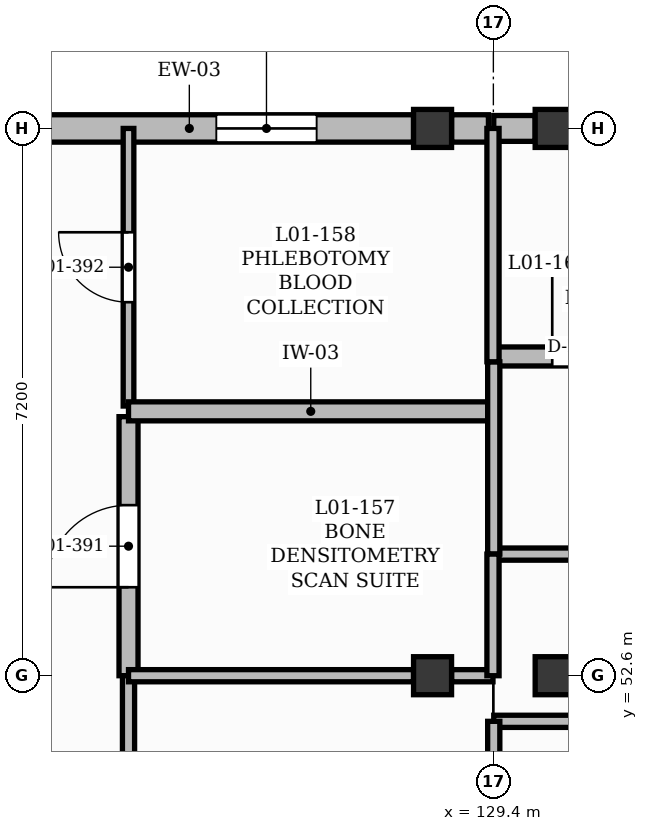
"""IFC4 building model, lengths in metres.
Left out: names, types, materials, properties, quantities, classifications, styles, units other than length and angle.
Written with IfcOpenShell. Run it as: python <this file> out.ifc"""

import sys

from ifc_helpers import new_model, si_unit, direction, frame, frame_2d, origin, origin_2d, place, context, subcontext, project, spatial, rectangle, extrude, element, fill, save


model = new_model("IFC4")
c1 = context("Model", 3, precision=1e-05, world=origin(), true_north=direction((0.0, 1.0)))
c2 = subcontext(c1, "Body", "Model", "MODEL_VIEW")
j1 = project(units=[si_unit("LENGTHUNIT", "METRE"), si_unit("PLANEANGLEUNIT", "RADIAN")], contexts=[c1])
p1 = place(None, origin())
s1 = spatial("IfcSite", under=j1, at=p1, CompositionType="ELEMENT")
p2 = place(p1, origin())
s2 = spatial("IfcBuilding", under=s1, at=p2, CompositionType="ELEMENT")
p3 = place(p2, frame((0.0, 0.0, 4.5)))
s3 = spatial("IfcBuildingStorey", under=s2, at=p3, CompositionType="ELEMENT", Elevation=4.5)
for number, where, z_axis, x_axis in (
    (1, (128.6, 52.6, 0.0), (0.0, 0.0, 1.0), (1.0, 0.0, 0.0)),
    (2, (128.6, 59.8, 0.0), (0.0, 0.0, 1.0), (1.0, 0.0, 0.0)),
    (3, (130.2, 52.6, 0.0), (0.0, 0.0, 1.0), (1.0, 0.0, 0.0)),
    (4, (130.2, 59.8, 0.0), (0.0, 0.0, 1.0), (1.0, 0.0, 0.0)),
):
    element("IfcColumn", number, at=place(p3, frame(where, z_axis=z_axis, x_axis=x_axis)), inside=s3, PredefinedType="COLUMN", context=c2, shape_type="SweptSolid", body=[
        extrude(rectangle(XDim=0.5, YDim=0.5, at=origin_2d()), origin(), (0.0, 0.0, 1.0), 4.22),
    ])
p4 = place(p3, frame((122.45, 59.8, 0.0), z_axis=(0.0, 0.0, 1.0), x_axis=(1.0, 0.0, 0.0)))
e5 = element("IfcWall", 5, at=p4, inside=s3, PredefinedType="SOLIDWALL", context=c2, shape_type="SweptSolid", body=[
    extrude(rectangle(XDim=5.9, YDim=0.36, at=frame_2d((2.95, 0.0))), origin(), (0.0, 0.0, 1.0), 3.52),
])
p5 = place(p4, frame((3.305, 0.0, 1.5)))
e6 = element("IfcOpeningElement", 6, at=p5, cuts=e5, PredefinedType="OPENING", context=c2, shape_type="SweptSolid", body=[
    extrude(rectangle(XDim=1.32, YDim=1.25, at=frame_2d((0.66, 0.625))), frame((0.0, 0.19, 0.0), z_axis=(0.0, -1.0, 0.0), x_axis=(1.0, 0.0, 0.0)), (0.0, 0.0, 1.0), 0.38),
])
p6 = place(p3, frame((128.85, 59.8, 0.0), z_axis=(0.0, 0.0, 1.0), x_axis=(1.0, 0.0, 0.0)))
e7 = element("IfcWall", 7, at=p6, inside=s3, PredefinedType="SOLIDWALL", context=c2, shape_type="SweptSolid", body=[
    extrude(rectangle(XDim=0.485, YDim=0.36, at=frame_2d((0.242, 0.0))), origin(), (0.0, 0.0, 1.0), 4.22),
])
p7 = place(p3, frame((129.405, 59.8, 0.0), z_axis=(0.0, 0.0, 1.0), x_axis=(1.0, 0.0, 0.0)))
e8 = element("IfcWall", 8, at=p7, inside=s3, PredefinedType="SOLIDWALL", context=c2, shape_type="SweptSolid", body=[
    extrude(rectangle(XDim=0.545, YDim=0.34, at=frame_2d((0.272, 0.0))), origin(), (0.0, 0.0, 1.0), 4.22),
])
p8 = place(p3, frame((124.6, 52.6, 0.0), z_axis=(0.0, 0.0, 1.0), x_axis=(0.0, 1.0, 0.0)))
e9 = element("IfcWall", 9, at=p8, inside=s3, PredefinedType="SOLIDWALL", context=c2, shape_type="SweptSolid", body=[
    extrude(rectangle(XDim=3.408, YDim=0.25, at=frame_2d((1.704, 0.0))), origin(), (0.0, 0.0, 1.0), 4.18),
])
p9 = place(p8, frame((1.164, 0.0, 0.0)))
e10 = element("IfcOpeningElement", 10, at=p9, cuts=e9, PredefinedType="OPENING", context=c2, shape_type="SweptSolid", body=[
    extrude(rectangle(XDim=1.08, YDim=2.15, at=frame_2d((0.54, 1.075))), frame((0.0, 0.135, 0.0), z_axis=(0.0, -1.0, 0.0), x_axis=(1.0, 0.0, 0.0)), (0.0, 0.0, 1.0), 0.27),
])
p10 = place(p3, frame((124.6, 56.148, 0.0), z_axis=(0.0, 0.0, 1.0), x_axis=(0.0, 1.0, 0.0)))
e11 = element("IfcWall", 11, at=p10, inside=s3, PredefinedType="PARTITIONING", context=c2, shape_type="SweptSolid", body=[
    extrude(rectangle(XDim=3.652, YDim=0.14, at=frame_2d((1.826, 0.0))), origin(), (0.0, 0.0, 1.0), 4.18),
])
p11 = place(p10, frame((1.366, 0.0, 0.0)))
e12 = element("IfcOpeningElement", 12, at=p11, cuts=e11, PredefinedType="OPENING", context=c2, shape_type="SweptSolid", body=[
    extrude(rectangle(XDim=0.92, YDim=2.1, at=frame_2d((0.46, 1.05))), frame((0.0, 0.08, 0.0), z_axis=(0.0, -1.0, 0.0), x_axis=(1.0, 0.0, 0.0)), (0.0, 0.0, 1.0), 0.16),
])
p12 = place(p3, frame((124.6, 56.078, 0.0), z_axis=(0.0, 0.0, 1.0), x_axis=(1.0, 0.0, 0.0)))
e13 = element("IfcWall", 13, at=p12, inside=s3, PredefinedType="SOLIDWALL", context=c2, shape_type="SweptSolid", body=[
    extrude(rectangle(XDim=4.795, YDim=0.25, at=frame_2d((2.397, 0.0))), origin(), (0.0, 0.0, 1.0), 4.18),
])
p13 = place(p3, frame((129.405, 56.8, 0.0), z_axis=(0.0, 0.0, 1.0), x_axis=(1.0, 0.0, 0.0)))
e14 = element("IfcWall", 14, at=p13, inside=s3, PredefinedType="SOLIDWALL", context=c2, shape_type="SweptSolid", body=[
    extrude(rectangle(XDim=2.619, YDim=0.25, at=frame_2d((1.31, 0.0))), origin(), (0.0, 0.0, 1.0), 4.18),
])
p14 = place(p13, frame((0.77, 0.0, 0.0)))
e15 = element("IfcOpeningElement", 15, at=p14, cuts=e14, PredefinedType="OPENING", context=c2, shape_type="SweptSolid", body=[
    extrude(rectangle(XDim=1.08, YDim=2.15, at=frame_2d((0.54, 1.075))), frame((0.0, 0.135, 0.0), z_axis=(0.0, -1.0, 0.0), x_axis=(1.0, 0.0, 0.0)), (0.0, 0.0, 1.0), 0.27),
])
p15 = place(p3, frame((124.6, 50.6, 0.0), z_axis=(0.0, 0.0, 1.0), x_axis=(0.0, 1.0, 0.0)))
e16 = element("IfcWall", 16, at=p15, inside=s3, PredefinedType="PARTITIONING", context=c2, shape_type="SweptSolid", body=[
    extrude(rectangle(XDim=2.0, YDim=0.16, at=frame_2d((1.0, 0.0))), origin(), (0.0, 0.0, 1.0), 4.18),
])
p16 = place(p3, frame((133.8, 52.0, 0.0), z_axis=(0.0, 0.0, 1.0), x_axis=(-1.0, 0.0, 0.0)))
e17 = element("IfcWall", 17, at=p16, inside=s3, PredefinedType="PARTITIONING", context=c2, shape_type="SweptSolid", body=[
    extrude(rectangle(XDim=4.395, YDim=0.16, at=frame_2d((2.198, 0.0))), origin(), (0.0, 0.0, 1.0), 4.18),
])
p17 = place(p3, frame((129.405, 50.6, 0.0), z_axis=(0.0, 0.0, 1.0), x_axis=(0.0, 1.0, 0.0)))
e18 = element("IfcWall", 18, at=p17, inside=s3, PredefinedType="PARTITIONING", context=c2, shape_type="SweptSolid", body=[
    extrude(rectangle(XDim=1.4, YDim=0.16, at=frame_2d((0.7, 0.0))), origin(), (0.0, 0.0, 1.0), 4.18),
])
p18 = place(p3, frame((129.405, 54.2, 0.0), z_axis=(0.0, 0.0, 1.0), x_axis=(1.0, 0.0, 0.0)))
e19 = element("IfcWall", 19, at=p18, inside=s3, PredefinedType="PARTITIONING", context=c2, shape_type="SweptSolid", body=[
    extrude(rectangle(XDim=4.395, YDim=0.16, at=frame_2d((2.198, 0.0))), origin(), (0.0, 0.0, 1.0), 4.18),
])
p19 = place(p3, frame((129.405, 54.2, 0.0), z_axis=(0.0, 0.0, 1.0), x_axis=(0.0, 1.0, 0.0)))
e20 = element("IfcWall", 20, at=p19, inside=s3, PredefinedType="PARTITIONING", context=c2, shape_type="SweptSolid", body=[
    extrude(rectangle(XDim=2.53, YDim=0.16, at=frame_2d((1.265, 0.0))), origin(), (0.0, 0.0, 1.0), 4.18),
])
p20 = place(p3, frame((124.6, 52.6, 0.0), z_axis=(0.0, 0.0, 1.0), x_axis=(1.0, 0.0, 0.0)))
e21 = element("IfcWall", 21, at=p20, inside=s3, PredefinedType="PARTITIONING", context=c2, shape_type="SweptSolid", body=[
    extrude(rectangle(XDim=3.75, YDim=0.16, at=frame_2d((1.875, 0.0))), origin(), (0.0, 0.0, 1.0), 3.52),
])
p21 = place(p3, frame((128.85, 52.6, 0.0), z_axis=(0.0, 0.0, 1.0), x_axis=(1.0, 0.0, 0.0)))
e22 = element("IfcWall", 22, at=p21, inside=s3, PredefinedType="PARTITIONING", context=c2, shape_type="SweptSolid", body=[
    extrude(rectangle(XDim=0.545, YDim=0.16, at=frame_2d((0.272, 0.0))), origin(), (0.0, 0.0, 1.0), 4.18),
])
p22 = place(p3, frame((129.395, 52.6, 0.0), z_axis=(0.0, 0.0, 1.0), x_axis=(0.0, 1.0, 0.0)))
e23 = element("IfcWall", 23, at=p22, inside=s3, PredefinedType="PARTITIONING", context=c2, shape_type="SweptSolid", body=[
    extrude(rectangle(XDim=1.6, YDim=0.16, at=frame_2d((0.8, 0.0))), origin(), (0.0, 0.0, 1.0), 4.18),
])
p23 = place(p3, frame((129.395, 56.73, 0.0), z_axis=(0.0, 0.0, 1.0), x_axis=(0.0, 1.0, 0.0)))
e24 = element("IfcWall", 24, at=p23, inside=s3, PredefinedType="PARTITIONING", context=c2, shape_type="SweptSolid", body=[
    extrude(rectangle(XDim=3.07, YDim=0.16, at=frame_2d((1.535, 0.0))), origin(), (0.0, 0.0, 1.0), 4.18),
])
p24 = place(p5, origin())
e25 = element("IfcWindow", 25, at=p24, inside=s3, PartitioningType="SINGLE_PANEL", PredefinedType="WINDOW", context=c2, shape_type="SweptSolid", body=[
    extrude(rectangle(XDim=1.32, YDim=1.25, at=frame_2d((0.66, 0.625))), frame((0.0, 0.03, 0.0), z_axis=(0.0, -1.0, 0.0), x_axis=(1.0, 0.0, 0.0)), (0.0, 0.0, 1.0), 0.06),
])
fill(e6, e25)
p25 = place(p9, origin())
e26 = element("IfcDoor", 26, at=p25, inside=s3, OperationType="SINGLE_SWING_LEFT", PredefinedType="DOOR", context=c2, shape_type="SweptSolid", body=[
    extrude(rectangle(XDim=1.08, YDim=2.15, at=frame_2d((0.54, 1.075))), frame((0.0, 0.025, 0.0), z_axis=(0.0, -1.0, 0.0), x_axis=(1.0, 0.0, 0.0)), (0.0, 0.0, 1.0), 0.05),
])
fill(e10, e26)
p26 = place(p11, origin())
e27 = element("IfcDoor", 27, at=p26, inside=s3, OperationType="SINGLE_SWING_RIGHT", PredefinedType="DOOR", context=c2, shape_type="SweptSolid", body=[
    extrude(rectangle(XDim=0.92, YDim=2.1, at=frame_2d((0.46, 1.05))), frame((0.0, 0.025, 0.0), z_axis=(0.0, -1.0, 0.0), x_axis=(1.0, 0.0, 0.0)), (0.0, 0.0, 1.0), 0.05),
])
fill(e12, e27)
p27 = place(p14, origin())
e28 = element("IfcDoor", 28, at=p27, inside=s3, OperationType="SINGLE_SWING_LEFT", PredefinedType="DOOR", context=c2, shape_type="SweptSolid", body=[
    extrude(rectangle(XDim=1.08, YDim=2.15, at=frame_2d((0.54, 1.075))), frame((0.0, 0.025, 0.0), z_axis=(0.0, -1.0, 0.0), x_axis=(1.0, 0.0, 0.0)), (0.0, 0.0, 1.0), 0.05),
])
fill(e15, e28)
save(model, sys.argv[1])
